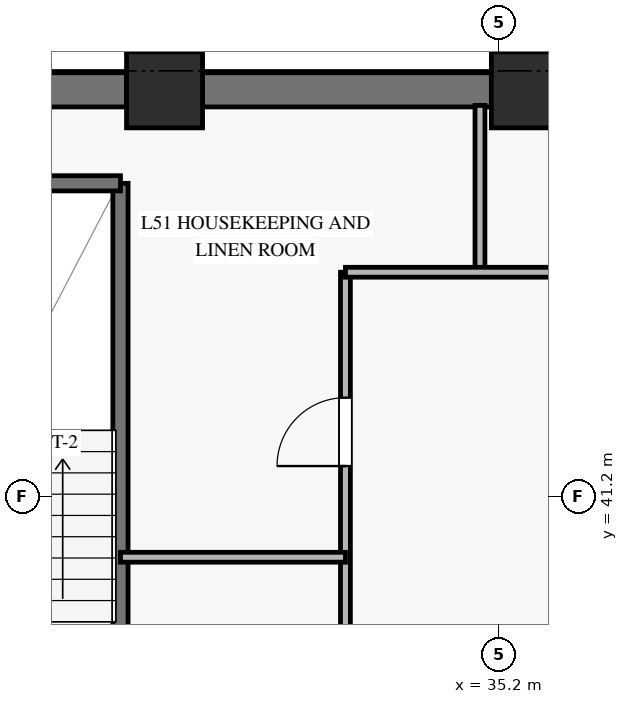
"""IFC4 building model, lengths in metres.
Left out: names, types, materials, properties, quantities, classifications, styles, units other than length and angle.
Written with IfcOpenShell. Run it as: python <this file> out.ifc"""

import sys

from ifc_helpers import new_model, si_unit, direction, frame, frame_2d, origin, origin_2d, place, context, subcontext, project, spatial, rectangle, extrude, source, transform, mapped, element, fill, save


model = new_model("IFC4")
c1 = context("Model", 3, precision=1e-05, world=origin(), true_north=direction((0.0, 1.0)))
c2 = subcontext(c1, "Body", "Model", "MODEL_VIEW")
j1 = project(units=[si_unit("LENGTHUNIT", "METRE"), si_unit("PLANEANGLEUNIT", "RADIAN")], contexts=[c1])
p1 = place(None, origin())
s1 = spatial("IfcSite", under=j1, at=p1, CompositionType="ELEMENT")
p2 = place(p1, origin())
s2 = spatial("IfcBuilding", under=s1, at=p2, CompositionType="ELEMENT")
p3 = place(p2, frame((0.0, 0.0, 202.7)))
s3 = spatial("IfcBuildingStorey", under=s2, at=p3, CompositionType="ELEMENT", Elevation=202.7)
m1 = source(origin(), c2, "Body", "SweptSolid", [
    extrude(rectangle(XDim=1.0, YDim=1.0, at=origin_2d()), origin(), (0.0, 0.0, 1.0), 3.27),
])
for number, where, z_axis, x_axis in (
    (1, (30.8, 46.55, 0.0), (0.0, 0.0, 1.0), (1.0, 0.0, 0.0)),
    (2, (35.6, 46.55, 0.0), (0.0, 0.0, 1.0), (1.0, 0.0, 0.0)),
):
    element("IfcColumn", number, at=place(p3, frame(where, z_axis=z_axis, x_axis=x_axis)), inside=s3, PredefinedType="PILASTER", context=c2, shape_type="MappedRepresentation", body=[
        mapped(m1, transform((0.0, 0.0, 0.0), x_axis=(1.0, 0.0, 0.0), y_axis=(0.0, 1.0, 0.0), z_axis=(0.0, 0.0, 1.0), scale=1.0)),
    ])
p4 = place(p3, frame((20.35, 46.55, 0.0), z_axis=(0.0, 0.0, 1.0), x_axis=(1.0, 0.0, 0.0)))
e3 = element("IfcWall", 3, at=p4, inside=s3, PredefinedType="SHEAR", context=c2, shape_type="SweptSolid", body=[
    extrude(rectangle(XDim=9.95, YDim=0.45, at=frame_2d((4.975, 0.0))), origin(), (0.0, 0.0, 1.0), 3.27),
])
p5 = place(p3, frame((31.3, 46.55, 0.0), z_axis=(0.0, 0.0, 1.0), x_axis=(1.0, 0.0, 0.0)))
e4 = element("IfcWall", 4, at=p5, inside=s3, PredefinedType="SHEAR", context=c2, shape_type="SweptSolid", body=[
    extrude(rectangle(XDim=3.8, YDim=0.45, at=frame_2d((1.9, 0.0))), origin(), (0.0, 0.0, 1.0), 3.27),
])
p6 = place(p3, frame((30.22, 38.07, 0.0), z_axis=(0.0, 0.0, 1.0), x_axis=(0.0, 1.0, 0.0)))
e5 = element("IfcWall", 5, at=p6, inside=s3, PredefinedType="SOLIDWALL", context=c2, shape_type="SweptSolid", body=[
    extrude(rectangle(XDim=7.25, YDim=0.2, at=frame_2d((3.625, 0.0))), origin(), (0.0, 0.0, 1.0), 3.5),
])
p7 = place(p3, frame((27.14, 45.32, 0.0), z_axis=(0.0, 0.0, 1.0), x_axis=(1.0, 0.0, 0.0)))
e6 = element("IfcWall", 6, at=p7, inside=s3, PredefinedType="SOLIDWALL", context=c2, shape_type="SweptSolid", body=[
    extrude(rectangle(XDim=3.08, YDim=0.2, at=frame_2d((1.54, 0.0))), origin(), (0.0, 0.0, 1.0), 3.5),
])
p8 = place(p3, frame((33.18, 37.655, 0.0), z_axis=(0.0, 0.0, 1.0), x_axis=(0.0, 1.0, 0.0)))
e7 = element("IfcWall", 7, at=p8, inside=s3, PredefinedType="PARTITIONING", context=c2, shape_type="SweptSolid", body=[
    extrude(rectangle(XDim=6.495, YDim=0.13, at=frame_2d((3.248, 0.0))), origin(), (0.0, 0.0, 1.0), 2.355),
])
p9 = place(p8, frame((0.945, 0.0, 0.0)))
e8 = element("IfcOpeningElement", 8, at=p9, cuts=e7, PredefinedType="OPENING", context=c2, shape_type="SweptSolid", body=[
    extrude(rectangle(XDim=0.9, YDim=2.1, at=frame_2d((0.45, 1.05))), frame((0.0, 0.075, 0.0), z_axis=(0.0, -1.0, 0.0), x_axis=(1.0, 0.0, 0.0)), (0.0, 0.0, 1.0), 0.15),
])
p10 = place(p8, frame((3.945, 0.0, 0.0)))
e9 = element("IfcOpeningElement", 9, at=p10, cuts=e7, PredefinedType="OPENING", context=c2, shape_type="SweptSolid", body=[
    extrude(rectangle(XDim=0.9, YDim=2.1, at=frame_2d((0.45, 1.05))), frame((0.0, 0.075, 0.0), z_axis=(0.0, -1.0, 0.0), x_axis=(1.0, 0.0, 0.0)), (0.0, 0.0, 1.0), 0.15),
])
p11 = place(p3, frame((34.95, 44.15, 0.0), z_axis=(0.0, 0.0, 1.0), x_axis=(0.0, 1.0, 0.0)))
e10 = element("IfcWall", 10, at=p11, inside=s3, PredefinedType="PARTITIONING", context=c2, shape_type="SweptSolid", body=[
    extrude(rectangle(XDim=2.195, YDim=0.13, at=frame_2d((1.098, 0.0))), origin(), (0.0, 0.0, 1.0), 3.27),
])
p12 = place(p3, frame((33.18, 44.15, 0.0), z_axis=(0.0, 0.0, 1.0), x_axis=(1.0, 0.0, 0.0)))
e11 = element("IfcWall", 11, at=p12, inside=s3, PredefinedType="PARTITIONING", context=c2, shape_type="SweptSolid", body=[
    extrude(rectangle(XDim=2.97, YDim=0.13, at=frame_2d((1.485, 0.0))), origin(), (0.0, 0.0, 1.0), 2.555),
])
p13 = place(p3, frame((30.22, 40.4, 0.0), z_axis=(0.0, 0.0, 1.0), x_axis=(1.0, 0.0, 0.0)))
e12 = element("IfcWall", 12, at=p13, inside=s3, PredefinedType="PARTITIONING", context=c2, shape_type="SweptSolid", body=[
    extrude(rectangle(XDim=2.96, YDim=0.13, at=frame_2d((1.48, 0.0))), origin(), (0.0, 0.0, 1.0), 2.555),
])
m2 = source(origin(), c2, "Body", "SweptSolid", [
    extrude(rectangle(XDim=0.9, YDim=2.1, at=frame_2d((0.45, 1.05))), frame((0.0, 0.025, 0.0), z_axis=(0.0, -1.0, 0.0), x_axis=(1.0, 0.0, 0.0)), (0.0, 0.0, 1.0), 0.05),
])
p14 = place(p10, origin())
e13 = element("IfcDoor", 13, at=p14, inside=s3, OperationType="SINGLE_SWING_LEFT", PredefinedType="DOOR", context=c2, shape_type="MappedRepresentation", body=[
    mapped(m2, transform((0.0, 0.0, 0.0), x_axis=(1.0, 0.0, 0.0), y_axis=(0.0, 1.0, 0.0), z_axis=(0.0, 0.0, 1.0), scale=1.0)),
])
fill(e9, e13)
save(model, sys.argv[1])
